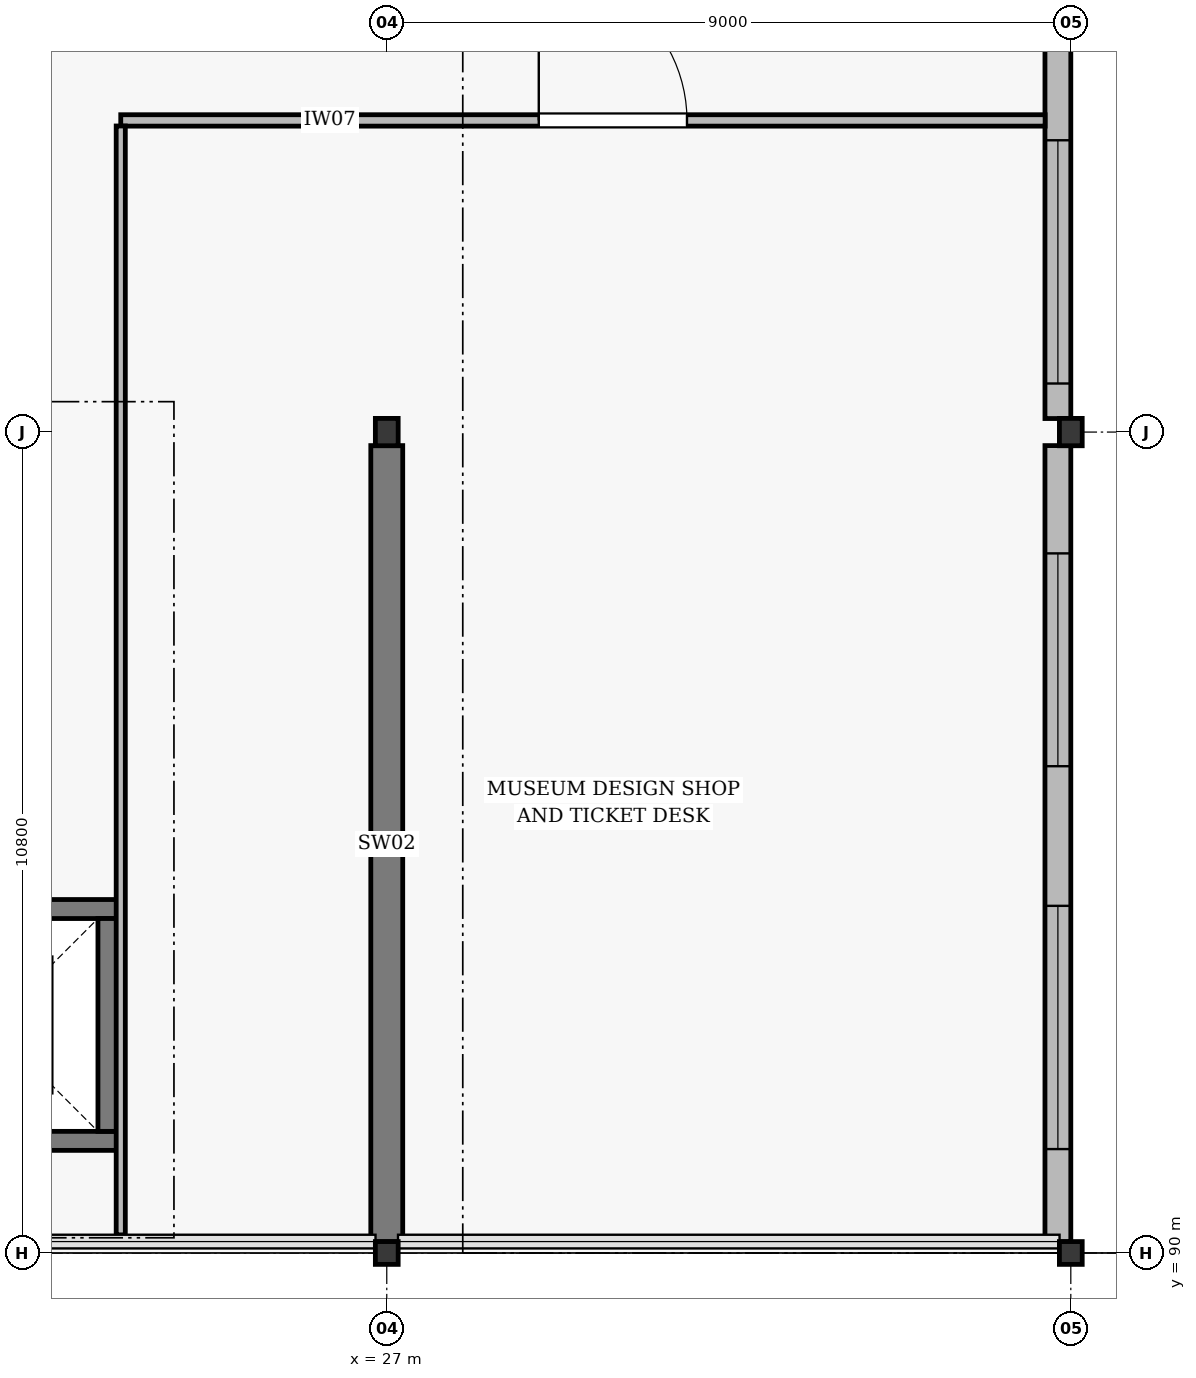
"""IFC4 building model, lengths in metres.
Left out: names, types, materials, properties, quantities, classifications, styles, units other than length and angle.
Written with IfcOpenShell. Run it as: python <this file> out.ifc"""

import sys

from ifc_helpers import new_model, si_unit, direction, frame, frame_2d, origin, origin_2d, place, context, subcontext, project, spatial, rectangle, i_section, extrude, element, fill, save


model = new_model("IFC4")
c1 = context("Model", 3, precision=1e-05, world=origin(), true_north=direction((0.0, 1.0)))
c2 = subcontext(c1, "Body", "Model", "MODEL_VIEW")
j1 = project(units=[si_unit("LENGTHUNIT", "METRE"), si_unit("PLANEANGLEUNIT", "RADIAN")], contexts=[c1])
p1 = place(None, origin())
s1 = spatial("IfcSite", under=j1, at=p1, CompositionType="ELEMENT")
p2 = place(p1, origin())
s2 = spatial("IfcBuilding", under=s1, at=p2, CompositionType="ELEMENT")
p3 = place(p2, frame((0.0, 0.0, 12.6)))
s3 = spatial("IfcBuildingStorey", under=s2, at=p3, CompositionType="ELEMENT", Elevation=12.6)
p4 = place(p3, frame((27.0, 90.0, 0.0), z_axis=(0.0, 0.0, 1.0), x_axis=(1.0, 0.0, 0.0)))
e1 = element("IfcColumn", 1, at=p4, inside=s3, PredefinedType="COLUMN", context=c2, shape_type="SweptSolid", body=[
    extrude(i_section(OverallWidth=0.3, OverallDepth=0.3, WebThickness=0.011, FlangeThickness=0.019, at=origin_2d()), origin(), (0.0, 0.0, 1.0), 4.8),
])
p5 = place(p3, frame((27.0, 100.8, 0.0), z_axis=(0.0, 0.0, 1.0), x_axis=(1.0, 0.0, 0.0)))
e2 = element("IfcColumn", 2, at=p5, inside=s3, PredefinedType="COLUMN", context=c2, shape_type="SweptSolid", body=[
    extrude(i_section(OverallWidth=0.3, OverallDepth=0.36, WebThickness=0.012, FlangeThickness=0.022, at=origin_2d()), origin(), (0.0, 0.0, 1.0), 4.8),
])
p6 = place(p3, frame((36.0, 90.0, 0.0), z_axis=(0.0, 0.0, 1.0), x_axis=(1.0, 0.0, 0.0)))
e3 = element("IfcColumn", 3, at=p6, inside=s3, PredefinedType="COLUMN", context=c2, shape_type="SweptSolid", body=[
    extrude(i_section(OverallWidth=0.3, OverallDepth=0.3, WebThickness=0.011, FlangeThickness=0.019, at=origin_2d()), origin(), (0.0, 0.0, 1.0), 4.8),
])
p7 = place(p3, frame((36.0, 100.8, 0.0), z_axis=(0.0, 0.0, 1.0), x_axis=(1.0, 0.0, 0.0)))
e4 = element("IfcColumn", 4, at=p7, inside=s3, PredefinedType="COLUMN", context=c2, shape_type="SweptSolid", body=[
    extrude(i_section(OverallWidth=0.3, OverallDepth=0.36, WebThickness=0.012, FlangeThickness=0.022, at=origin_2d()), origin(), (0.0, 0.0, 1.0), 4.8),
])
p8 = place(p3, frame((27.0, 90.148, 0.0), z_axis=(0.0, 0.0, 1.0), x_axis=(0.0, 1.0, 0.0)))
e5 = element("IfcWall", 5, at=p8, inside=s3, PredefinedType="SHEAR", context=c2, shape_type="SweptSolid", body=[
    extrude(rectangle(XDim=10.474, YDim=0.42, at=frame_2d((5.237, 0.0))), origin(), (0.0, 0.0, 1.0), 4.55),
])
p9 = place(p3, frame((35.83, 90.148, 0.0), z_axis=(0.0, 0.0, 1.0), x_axis=(0.0, 1.0, 0.0)))
e6 = element("IfcWall", 6, at=p9, inside=s3, PredefinedType="STANDARD", context=c2, shape_type="SweptSolid", body=[
    extrude(rectangle(XDim=10.474, YDim=0.34, at=frame_2d((5.237, 0.0))), origin(), (0.0, 0.0, 1.0), 4.22),
])
p10 = place(p9, frame((1.219, 0.0, 0.75)))
e7 = element("IfcOpeningElement", 7, at=p10, cuts=e6, PredefinedType="OPENING", context=c2, shape_type="SweptSolid", body=[
    extrude(rectangle(XDim=3.2, YDim=2.8, at=frame_2d((1.6, 1.4))), frame((0.0, 0.182, 0.0), z_axis=(0.0, -1.0, 0.0), x_axis=(1.0, 0.0, 0.0)), (0.0, 0.0, 1.0), 0.364),
])
p11 = place(p9, frame((6.256, 0.0, 0.75)))
e8 = element("IfcOpeningElement", 8, at=p11, cuts=e6, PredefinedType="OPENING", context=c2, shape_type="SweptSolid", body=[
    extrude(rectangle(XDim=2.8, YDim=2.6, at=frame_2d((1.4, 1.3))), frame((0.0, 0.182, 0.0), z_axis=(0.0, -1.0, 0.0), x_axis=(1.0, 0.0, 0.0)), (0.0, 0.0, 1.0), 0.364),
])
p12 = place(p3, frame((35.83, 100.978, 0.0), z_axis=(0.0, 0.0, 1.0), x_axis=(0.0, 1.0, 0.0)))
e9 = element("IfcWall", 9, at=p12, inside=s3, PredefinedType="STANDARD", context=c2, shape_type="SweptSolid", body=[
    extrude(rectangle(XDim=10.444, YDim=0.34, at=frame_2d((5.222, 0.0))), origin(), (0.0, 0.0, 1.0), 4.22),
])
p13 = place(p12, frame((0.461, 0.0, 0.75)))
e10 = element("IfcOpeningElement", 10, at=p13, cuts=e9, PredefinedType="OPENING", context=c2, shape_type="SweptSolid", body=[
    extrude(rectangle(XDim=3.2, YDim=2.8, at=frame_2d((1.6, 1.4))), frame((0.0, 0.182, 0.0), z_axis=(0.0, -1.0, 0.0), x_axis=(1.0, 0.0, 0.0)), (0.0, 0.0, 1.0), 0.364),
])
p14 = place(p12, frame((4.883, 0.0, 0.75)))
e11 = element("IfcOpeningElement", 11, at=p14, cuts=e9, PredefinedType="OPENING", context=c2, shape_type="SweptSolid", body=[
    extrude(rectangle(XDim=2.8, YDim=2.6, at=frame_2d((1.4, 1.3))), frame((0.0, 0.182, 0.0), z_axis=(0.0, -1.0, 0.0), x_axis=(1.0, 0.0, 0.0)), (0.0, 0.0, 1.0), 0.364),
])
p15 = place(p3, frame((20.15, 91.475, 0.0), z_axis=(0.0, 0.0, 1.0), x_axis=(1.0, 0.0, 0.0)))
e12 = element("IfcWall", 12, at=p15, inside=s3, PredefinedType="SOLIDWALL", context=c2, shape_type="SweptSolid", body=[
    extrude(rectangle(XDim=3.3, YDim=0.25, at=frame_2d((1.65, 0.0))), origin(), (0.0, 0.0, 1.0), 3.05),
])
p16 = place(p3, frame((20.15, 94.525, 0.0), z_axis=(0.0, 0.0, 1.0), x_axis=(1.0, 0.0, 0.0)))
e13 = element("IfcWall", 13, at=p16, inside=s3, PredefinedType="SOLIDWALL", context=c2, shape_type="SweptSolid", body=[
    extrude(rectangle(XDim=3.3, YDim=0.25, at=frame_2d((1.65, 0.0))), origin(), (0.0, 0.0, 1.0), 3.05),
])
p17 = place(p16, frame((0.95, 0.0, 0.005)))
e14 = element("IfcOpeningElement", 14, at=p17, cuts=e13, PredefinedType="OPENING", context=c2, shape_type="SweptSolid", body=[
    extrude(rectangle(XDim=1.4, YDim=2.25, at=frame_2d((0.7, 1.125))), frame((0.0, 0.137, 0.0), z_axis=(0.0, -1.0, 0.0), x_axis=(1.0, 0.0, 0.0)), (0.0, 0.0, 1.0), 0.274),
])
p18 = place(p3, frame((23.325, 91.6, 0.0), z_axis=(0.0, 0.0, 1.0), x_axis=(0.0, 1.0, 0.0)))
e15 = element("IfcWall", 15, at=p18, inside=s3, PredefinedType="SOLIDWALL", context=c2, shape_type="SweptSolid", body=[
    extrude(rectangle(XDim=2.8, YDim=0.25, at=frame_2d((1.4, 0.0))), origin(), (0.0, 0.0, 1.0), 3.05),
])
p19 = place(p3, frame((23.5, 104.9, 0.0), z_axis=(0.0, 0.0, 1.0), x_axis=(1.0, 0.0, 0.0)))
e16 = element("IfcWall", 16, at=p19, inside=s3, PredefinedType="PARTITIONING", context=c2, shape_type="SweptSolid", body=[
    extrude(rectangle(XDim=12.162, YDim=0.15, at=frame_2d((6.081, 0.0))), origin(), (0.0, 0.0, 1.0), 4.22),
])
p20 = place(p19, frame((5.5, 0.0, 0.005)))
e17 = element("IfcOpeningElement", 17, at=p20, cuts=e16, PredefinedType="OPENING", context=c2, shape_type="SweptSolid", body=[
    extrude(rectangle(XDim=1.95, YDim=2.3, at=frame_2d((0.975, 1.15))), frame((0.0, 0.087, 0.0), z_axis=(0.0, -1.0, 0.0), x_axis=(1.0, 0.0, 0.0)), (0.0, 0.0, 1.0), 0.174),
])
p21 = place(p3, frame((23.5, 90.238, 0.0), z_axis=(0.0, 0.0, 1.0), x_axis=(0.0, 1.0, 0.0)))
e18 = element("IfcWall", 18, at=p21, inside=s3, PredefinedType="PARTITIONING", context=c2, shape_type="SweptSolid", body=[
    extrude(rectangle(XDim=14.589, YDim=0.12, at=frame_2d((7.294, 0.0))), origin(), (0.0, 0.0, 1.0), 4.22),
])
p22 = place(p10, origin())
e19 = element("IfcWindow", 19, at=p22, inside=s3, PartitioningType="DOUBLE_PANEL_VERTICAL", PredefinedType="WINDOW", context=c2, shape_type="SweptSolid", body=[
    extrude(rectangle(XDim=3.2, YDim=2.8, at=frame_2d((1.6, 1.4))), frame((0.0, 0.03, 0.0), z_axis=(0.0, -1.0, 0.0), x_axis=(1.0, 0.0, 0.0)), (0.0, 0.0, 1.0), 0.06),
])
fill(e7, e19)
p23 = place(p11, origin())
e20 = element("IfcWindow", 20, at=p23, inside=s3, PartitioningType="DOUBLE_PANEL_VERTICAL", PredefinedType="WINDOW", context=c2, shape_type="SweptSolid", body=[
    extrude(rectangle(XDim=2.8, YDim=2.6, at=frame_2d((1.4, 1.3))), frame((0.0, 0.03, 0.0), z_axis=(0.0, -1.0, 0.0), x_axis=(1.0, 0.0, 0.0)), (0.0, 0.0, 1.0), 0.06),
])
fill(e8, e20)
p24 = place(p13, origin())
e21 = element("IfcWindow", 21, at=p24, inside=s3, PartitioningType="DOUBLE_PANEL_VERTICAL", PredefinedType="WINDOW", context=c2, shape_type="SweptSolid", body=[
    extrude(rectangle(XDim=3.2, YDim=2.8, at=frame_2d((1.6, 1.4))), frame((0.0, 0.03, 0.0), z_axis=(0.0, -1.0, 0.0), x_axis=(1.0, 0.0, 0.0)), (0.0, 0.0, 1.0), 0.06),
])
fill(e10, e21)
p25 = place(p20, origin())
e22 = element("IfcDoor", 22, at=p25, inside=s3, OperationType="DOUBLE_DOOR_SINGLE_SWING", PredefinedType="DOOR", context=c2, shape_type="SweptSolid", body=[
    extrude(rectangle(XDim=1.95, YDim=2.3, at=frame_2d((0.975, 1.15))), frame((0.0, 0.025, 0.0), z_axis=(0.0, -1.0, 0.0), x_axis=(1.0, 0.0, 0.0)), (0.0, 0.0, 1.0), 0.05),
])
fill(e17, e22)
save(model, sys.argv[1])
